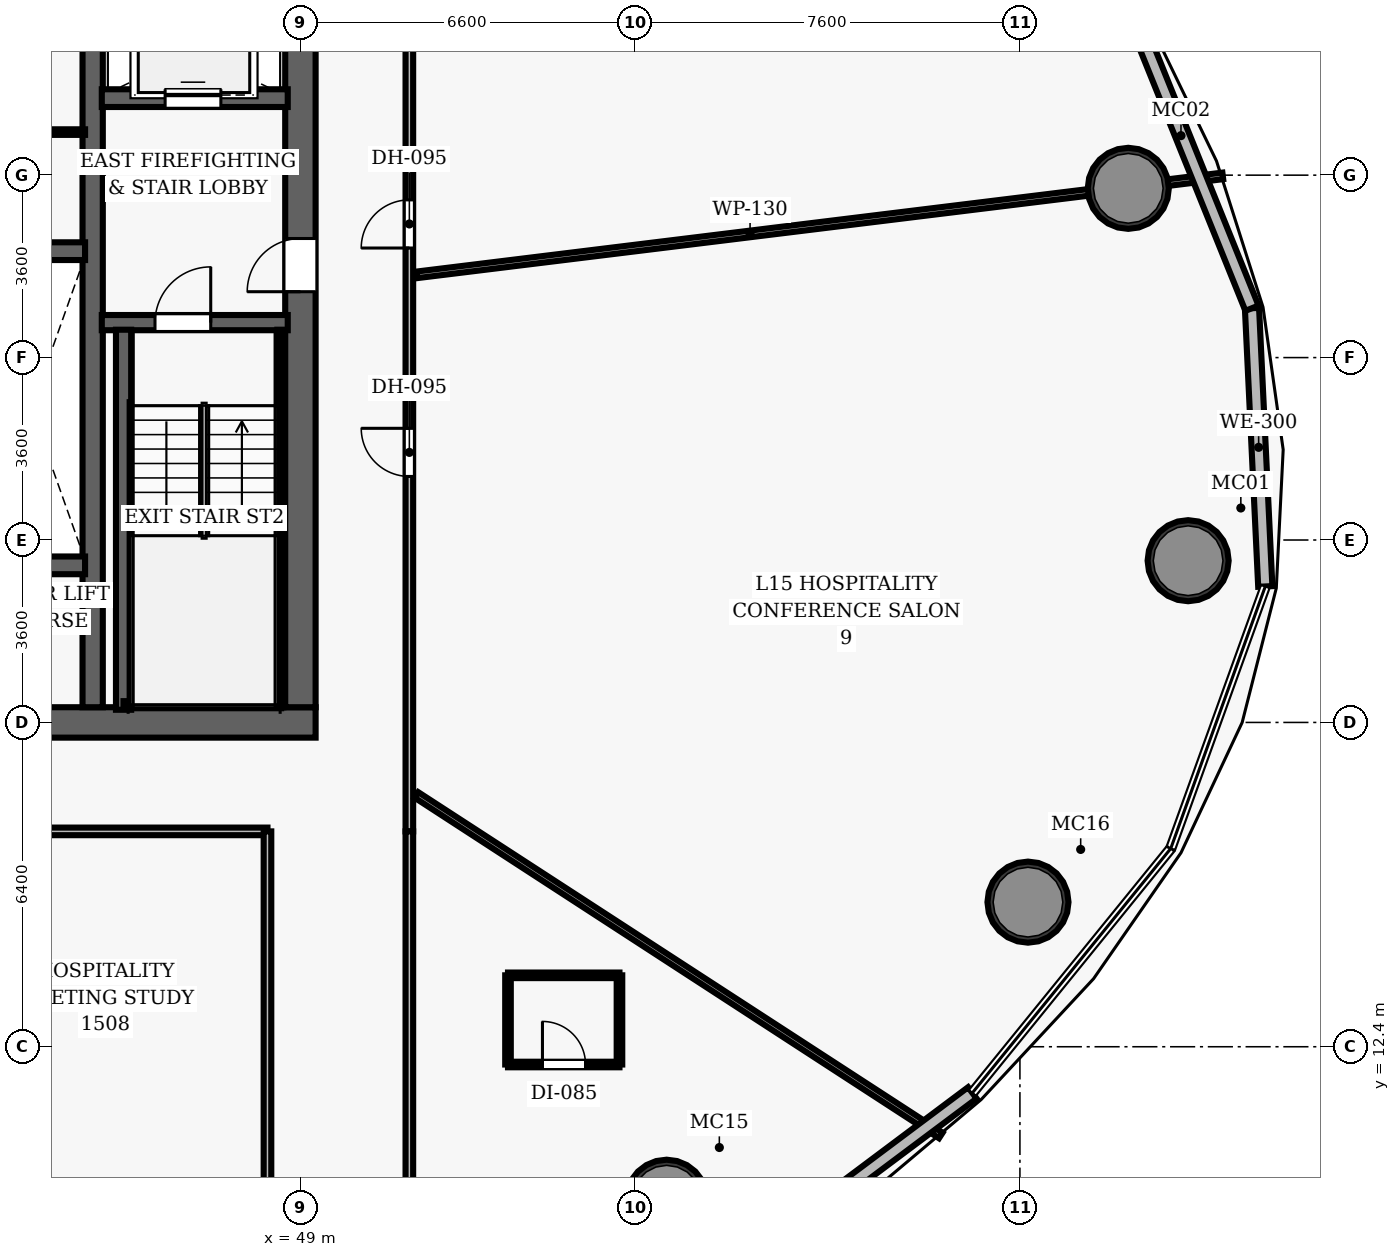
"""IFC4 building model, lengths in metres.
Left out: names, types, materials, properties, quantities, classifications, styles, units other than length and angle.
Written with IfcOpenShell. Run it as: python <this file> out.ifc"""

import sys

from ifc_helpers import new_model, si_unit, direction, frame, frame_2d, origin, origin_2d, place, context, subcontext, project, spatial, rectangle, hollow_circle, extrude, element, fill, save


model = new_model("IFC4")
c1 = context("Model", 3, precision=1e-05, world=origin(), true_north=direction((0.0, 1.0)))
c2 = subcontext(c1, "Body", "Model", "MODEL_VIEW")
j1 = project(units=[si_unit("LENGTHUNIT", "METRE"), si_unit("PLANEANGLEUNIT", "RADIAN")], contexts=[c1])
p1 = place(None, origin())
s1 = spatial("IfcSite", under=j1, at=p1, CompositionType="ELEMENT")
p2 = place(p1, origin())
s2 = spatial("IfcBuilding", under=s1, at=p2, CompositionType="ELEMENT")
p3 = place(p2, frame((0.0, 0.0, 69.4)))
s3 = spatial("IfcBuildingStorey", under=s2, at=p3, CompositionType="ELEMENT", Elevation=69.4)
p4 = place(p3, frame((26.7, 18.8, 0.0), z_axis=(0.0, 0.0, 1.0), x_axis=(1.0, 0.0, 0.0)))
e1 = element("IfcWall", 1, at=p4, inside=s3, PredefinedType="SHEAR", context=c2, shape_type="SweptSolid", body=[
    extrude(rectangle(XDim=22.6, YDim=0.6, at=frame_2d((11.3, 0.0))), origin(), (0.0, 0.0, 1.0), 3.5),
])
p5 = place(p4, frame((14.52, 0.0, 0.0)))
e2 = element("IfcOpeningElement", 2, at=p5, cuts=e1, PredefinedType="OPENING", context=c2, shape_type="SweptSolid", body=[
    extrude(rectangle(XDim=1.05, YDim=2.15, at=frame_2d((0.525, 1.075))), frame((0.0, 0.31, 0.0), z_axis=(0.0, -1.0, 0.0), x_axis=(1.0, 0.0, 0.0)), (0.0, 0.0, 1.0), 0.62),
])
p6 = place(p3, frame((49.0, 19.1, 0.0), z_axis=(0.0, 0.0, 1.0), x_axis=(0.0, 1.0, 0.0)))
e3 = element("IfcWall", 3, at=p6, inside=s3, PredefinedType="SHEAR", context=c2, shape_type="SweptSolid", body=[
    extrude(rectangle(XDim=13.8, YDim=0.6, at=frame_2d((6.9, 0.0))), origin(), (0.0, 0.0, 1.0), 3.5),
])
p7 = place(p6, frame((8.2, 0.0, 0.0)))
e4 = element("IfcOpeningElement", 4, at=p7, cuts=e3, PredefinedType="OPENING", context=c2, shape_type="SweptSolid", body=[
    extrude(rectangle(XDim=1.05, YDim=2.15, at=frame_2d((0.525, 1.075))), frame((0.0, 0.31, 0.0), z_axis=(0.0, -1.0, 0.0), x_axis=(1.0, 0.0, 0.0)), (0.0, 0.0, 1.0), 0.62),
])
p8 = place(p3, frame((44.9, 19.1, 0.0), z_axis=(0.0, 0.0, 1.0), x_axis=(0.0, 1.0, 0.0)))
e5 = element("IfcWall", 5, at=p8, inside=s3, PredefinedType="SHEAR", context=c2, shape_type="SweptSolid", body=[
    extrude(rectangle(XDim=13.8, YDim=0.4, at=frame_2d((6.9, 0.0))), origin(), (0.0, 0.0, 1.0), 3.5),
])
for number, where, z_axis, x_axis in (
    (6, (66.52, 21.992, 0.0), (0.0, 0.0, 1.0), (1.0, 0.0, 0.0)),
    (7, (65.339, 29.34, 0.0), (0.0, 0.0, 1.0), (1.0, 0.0, 0.0)),
    (8, (56.228, 9.371, 0.0), (0.0, 0.0, 1.0), (1.0, 0.0, 0.0)),
    (9, (63.359, 15.254, 0.0), (0.0, 0.0, 1.0), (1.0, 0.0, 0.0)),
):
    element("IfcColumn", number, at=place(p3, frame(where, z_axis=z_axis, x_axis=x_axis)), inside=s3, PredefinedType="COLUMN", context=c2, shape_type="SweptSolid", body=[
        extrude(hollow_circle(Radius=0.8, WallThickness=0.06, at=origin_2d()), origin(), (0.0, 0.0, 1.0), 3.5),
    ])
p9 = place(p3, frame((45.08, 26.69, 0.0), z_axis=(0.0, 0.0, 1.0), x_axis=(1.0, 0.0, 0.0)))
e10 = element("IfcWall", 10, at=p9, inside=s3, PredefinedType="SHEAR", context=c2, shape_type="SweptSolid", body=[
    extrude(rectangle(XDim=3.67, YDim=0.3, at=frame_2d((1.835, 0.0))), origin(), (0.0, 0.0, 1.0), 3.5),
])
p10 = place(p9, frame((1.05, 0.0, 0.0)))
e11 = element("IfcOpeningElement", 11, at=p10, cuts=e10, PredefinedType="OPENING", context=c2, shape_type="SweptSolid", body=[
    extrude(rectangle(XDim=1.1, YDim=2.15, at=frame_2d((0.55, 1.075))), frame((0.0, 0.16, 0.0), z_axis=(0.0, -1.0, 0.0), x_axis=(1.0, 0.0, 0.0)), (0.0, 0.0, 1.0), 0.32),
])
p11 = place(p3, frame((45.51, 19.05, 0.0), z_axis=(0.0, 0.0, 1.0), x_axis=(0.0, 1.0, 0.0)))
e12 = element("IfcWall", 12, at=p11, inside=s3, PredefinedType="SHEAR", context=c2, shape_type="SweptSolid", body=[
    extrude(rectangle(XDim=7.5, YDim=0.3, at=frame_2d((3.75, 0.0))), origin(), (0.0, 0.0, 1.0), 3.5),
])
p12 = place(p3, frame((48.605, 19.1, 0.0), z_axis=(0.0, 0.0, 1.0), x_axis=(0.0, 1.0, 0.0)))
e13 = element("IfcWall", 13, at=p12, inside=s3, PredefinedType="SHEAR", context=c2, shape_type="SweptSolid", body=[
    extrude(rectangle(XDim=7.45, YDim=0.12, at=frame_2d((3.725, 0.0))), origin(), (0.0, 0.0, 1.0), 3.5),
])
p13 = place(p3, frame((45.51, 19.16, 0.0), z_axis=(0.0, 0.0, 1.0), x_axis=(1.0, 0.0, 0.0)))
e14 = element("IfcWall", 14, at=p13, inside=s3, PredefinedType="SHEAR", context=c2, shape_type="SweptSolid", body=[
    extrude(rectangle(XDim=3.095, YDim=0.12, at=frame_2d((1.547, 0.0))), origin(), (0.0, 0.0, 1.0), 3.5),
])
p14 = place(p3, frame((45.08, 31.12, 0.0), z_axis=(0.0, 0.0, 1.0), x_axis=(1.0, 0.0, 0.0)))
e15 = element("IfcWall", 15, at=p14, inside=s3, PredefinedType="SHEAR", context=c2, shape_type="SweptSolid", body=[
    extrude(rectangle(XDim=3.67, YDim=0.35, at=frame_2d((1.835, 0.0))), origin(), (0.0, 0.0, 1.0), 2.6),
])
p15 = place(p14, frame((1.25, 0.0, 0.0)))
e16 = element("IfcOpeningElement", 16, at=p15, cuts=e15, PredefinedType="OPENING", context=c2, shape_type="SweptSolid", body=[
    extrude(rectangle(XDim=1.1, YDim=2.15, at=frame_2d((0.55, 1.075))), frame((0.0, 0.185, 0.0), z_axis=(0.0, -1.0, 0.0), x_axis=(1.0, 0.0, 0.0)), (0.0, 0.0, 1.0), 0.37),
])
for number, where, z_axis, x_axis in (
    (17, (42.72, 21.9, 0.0), (0.0, 0.0, 1.0), (1.0, 0.0, 0.0)),
    (18, (42.72, 28.1, 0.0), (0.0, 0.0, 1.0), (1.0, 0.0, 0.0)),
):
    element("IfcWall", number, at=place(p3, frame(where, z_axis=z_axis, x_axis=x_axis)), inside=s3, PredefinedType="SHEAR", context=c2, shape_type="SweptSolid", body=[
        extrude(rectangle(XDim=2.03, YDim=0.35, at=frame_2d((1.015, 0.0))), origin(), (0.0, 0.0, 1.0), 2.6),
    ])
p16 = place(p3, frame((42.55, 30.45, 0.0), z_axis=(0.0, 0.0, 1.0), x_axis=(1.0, 0.0, 0.0)))
e19 = element("IfcWall", 19, at=p16, inside=s3, PredefinedType="PARTITIONING", context=c2, shape_type="SweptSolid", body=[
    extrude(rectangle(XDim=2.2, YDim=0.11, at=frame_2d((1.1, 0.0))), origin(), (0.0, 0.0, 1.0), 2.6),
])
p17 = place(p3, frame((24.85, 16.65, 0.0), z_axis=(0.0, 0.0, 1.0), x_axis=(1.0, 0.0, 0.0)))
e20 = element("IfcWall", 20, at=p17, inside=s3, PredefinedType="PARTITIONING", context=c2, shape_type="SweptSolid", body=[
    extrude(rectangle(XDim=23.5, YDim=0.15, at=frame_2d((11.75, 0.0))), origin(), (0.0, 0.0, 1.0), 2.6),
])
p18 = place(p17, frame((6.595, 0.0, 0.0)))
e21 = element("IfcOpeningElement", 21, at=p18, cuts=e20, PredefinedType="OPENING", context=c2, shape_type="SweptSolid", body=[
    extrude(rectangle(XDim=0.95, YDim=2.15, at=frame_2d((0.475, 1.075))), frame((0.0, 0.085, 0.0), z_axis=(0.0, -1.0, 0.0), x_axis=(1.0, 0.0, 0.0)), (0.0, 0.0, 1.0), 0.17),
])
p19 = place(p17, frame((13.99, 0.0, 0.0)))
e22 = element("IfcOpeningElement", 22, at=p19, cuts=e20, PredefinedType="OPENING", context=c2, shape_type="SweptSolid", body=[
    extrude(rectangle(XDim=0.95, YDim=2.15, at=frame_2d((0.475, 1.075))), frame((0.0, 0.085, 0.0), z_axis=(0.0, -1.0, 0.0), x_axis=(1.0, 0.0, 0.0)), (0.0, 0.0, 1.0), 0.17),
])
p20 = place(p17, frame((17.211, 0.0, 0.0)))
e23 = element("IfcOpeningElement", 23, at=p20, cuts=e20, PredefinedType="OPENING", context=c2, shape_type="SweptSolid", body=[
    extrude(rectangle(XDim=0.95, YDim=2.15, at=frame_2d((0.475, 1.075))), frame((0.0, 0.085, 0.0), z_axis=(0.0, -1.0, 0.0), x_axis=(1.0, 0.0, 0.0)), (0.0, 0.0, 1.0), 0.17),
])
p21 = place(p3, frame((51.15, 16.65, 0.0), z_axis=(0.0, 0.0, 1.0), x_axis=(0.0, 1.0, 0.0)))
e24 = element("IfcWall", 24, at=p21, inside=s3, PredefinedType="PARTITIONING", context=c2, shape_type="SweptSolid", body=[
    extrude(rectangle(XDim=15.9, YDim=0.15, at=frame_2d((7.95, 0.0))), origin(), (0.0, 0.0, 1.0), 2.6),
])
p22 = place(p21, frame((11.512, 0.0, 0.0)))
e25 = element("IfcOpeningElement", 25, at=p22, cuts=e24, PredefinedType="OPENING", context=c2, shape_type="SweptSolid", body=[
    extrude(rectangle(XDim=0.95, YDim=2.15, at=frame_2d((0.475, 1.075))), frame((0.0, 0.085, 0.0), z_axis=(0.0, -1.0, 0.0), x_axis=(1.0, 0.0, 0.0)), (0.0, 0.0, 1.0), 0.17),
])
p23 = place(p21, frame((7.004, 0.0, 0.0)))
e26 = element("IfcOpeningElement", 26, at=p23, cuts=e24, PredefinedType="OPENING", context=c2, shape_type="SweptSolid", body=[
    extrude(rectangle(XDim=0.95, YDim=2.15, at=frame_2d((0.475, 1.075))), frame((0.0, 0.085, 0.0), z_axis=(0.0, -1.0, 0.0), x_axis=(1.0, 0.0, 0.0)), (0.0, 0.0, 1.0), 0.17),
])
for number, where, z_axis, x_axis in (
    (27, (48.35, 6.5, 0.0), (0.0, 0.0, 1.0), (0.0, 1.0, 0.0)),
    (28, (51.15, 6.5, 0.0), (0.0, 0.0, 1.0), (0.0, 1.0, 0.0)),
):
    element("IfcWall", number, at=place(p3, frame(where, z_axis=z_axis, x_axis=x_axis)), inside=s3, PredefinedType="PARTITIONING", context=c2, shape_type="SweptSolid", body=[
        extrude(rectangle(XDim=10.15, YDim=0.15, at=frame_2d((5.075, 0.0))), origin(), (0.0, 0.0, 1.0), 2.6),
    ])
p24 = place(p3, frame((51.29, 27.632, 0.0), z_axis=(0.0, 0.0, 1.0), x_axis=(0.992547009995, 0.121862352469, 0.0)))
e29 = element("IfcWall", 29, at=p24, inside=s3, PredefinedType="PARTITIONING", context=c2, shape_type="SweptSolid", body=[
    extrude(rectangle(XDim=16.033, YDim=0.13, at=frame_2d((8.017, 0.0))), origin(), (0.0, 0.0, 1.0), 2.6),
])
p25 = place(p3, frame((40.901, 16.51, 0.0), z_axis=(0.0, 0.0, 1.0), x_axis=(0.292374733108, -0.956303830087, 0.0)))
e30 = element("IfcWall", 30, at=p25, inside=s3, PredefinedType="PARTITIONING", context=c2, shape_type="SweptSolid", body=[
    extrude(rectangle(XDim=14.692, YDim=0.13, at=frame_2d((7.346, 0.0))), origin(), (0.0, 0.0, 1.0), 2.6),
])
p26 = place(p3, frame((51.29, 17.369, 0.0), z_axis=(0.0, 0.0, 1.0), x_axis=(0.838662335308, -0.544651711955, 0.0)))
e31 = element("IfcWall", 31, at=p26, inside=s3, PredefinedType="PARTITIONING", context=c2, shape_type="SweptSolid", body=[
    extrude(rectangle(XDim=12.339, YDim=0.13, at=frame_2d((6.17, 0.0))), origin(), (0.0, 0.0, 1.0), 2.6),
])
p27 = place(p3, frame((53.097, 12.049, 0.0), z_axis=(0.0, 0.0, 1.0), x_axis=(1.0, 0.0, 0.0)))
e32 = element("IfcWall", 32, at=p27, inside=s3, PredefinedType="PARTITIONING", context=c2, shape_type="SweptSolid", body=[
    extrude(rectangle(XDim=2.2, YDim=0.11, at=frame_2d((1.1, 0.0))), origin(), (0.0, 0.0, 1.0), 2.6),
])
p28 = place(p27, frame((0.68, 0.0, 0.0)))
e33 = element("IfcOpeningElement", 33, at=p28, cuts=e32, PredefinedType="OPENING", context=c2, shape_type="SweptSolid", body=[
    extrude(rectangle(XDim=0.85, YDim=2.1, at=frame_2d((0.425, 1.05))), frame((0.0, 0.065, 0.0), z_axis=(0.0, -1.0, 0.0), x_axis=(1.0, 0.0, 0.0)), (0.0, 0.0, 1.0), 0.13),
])
p29 = place(p3, frame((53.097, 13.809, 0.0), z_axis=(0.0, 0.0, 1.0), x_axis=(1.0, 0.0, 0.0)))
e34 = element("IfcWall", 34, at=p29, inside=s3, PredefinedType="PARTITIONING", context=c2, shape_type="SweptSolid", body=[
    extrude(rectangle(XDim=2.2, YDim=0.11, at=frame_2d((1.1, 0.0))), origin(), (0.0, 0.0, 1.0), 2.6),
])
for number, where, z_axis, x_axis in (
    (35, (53.097, 12.049, 0.0), (0.0, 0.0, 1.0), (0.0, 1.0, 0.0)),
    (36, (55.297, 12.049, 0.0), (0.0, 0.0, 1.0), (0.0, 1.0, 0.0)),
):
    element("IfcWall", number, at=place(p3, frame(where, z_axis=z_axis, x_axis=x_axis)), inside=s3, PredefinedType="PARTITIONING", context=c2, shape_type="SweptSolid", body=[
        extrude(rectangle(XDim=1.76, YDim=0.11, at=frame_2d((0.88, 0.0))), origin(), (0.0, 0.0, 1.0), 2.6),
    ])
p30 = place(p3, frame((67.78, 26.975, 0.0), z_axis=(0.0, 0.0, 1.0), x_axis=(0.047784583266, -0.998857664336, 0.0)))
e37 = element("IfcWall", 37, at=p30, inside=s3, PredefinedType="SOLIDWALL", context=c2, shape_type="SweptSolid", body=[
    extrude(rectangle(XDim=5.498, YDim=0.28, at=frame_2d((2.749, 0.0))), origin(), (0.0, 0.0, 1.0), 3.25),
])
p31 = place(p3, frame((65.456, 32.735, 0.0), z_axis=(0.0, 0.0, 1.0), x_axis=(0.374153712501, -0.9273667017, 0.0)))
e38 = element("IfcWall", 38, at=p31, inside=s3, PredefinedType="SOLIDWALL", context=c2, shape_type="SweptSolid", body=[
    extrude(rectangle(XDim=6.212, YDim=0.28, at=frame_2d((3.106, 0.0))), origin(), (0.0, 0.0, 1.0), 3.25),
])
p32 = place(p3, frame((62.261, 11.489, 0.0), z_axis=(0.0, 0.0, 1.0), x_axis=(-0.800594336171, -0.599206733015, 0.0)))
e39 = element("IfcWall", 39, at=p32, inside=s3, PredefinedType="SOLIDWALL", context=c2, shape_type="SweptSolid", body=[
    extrude(rectangle(XDim=7.143, YDim=0.28, at=frame_2d((3.571, 0.0))), origin(), (0.0, 0.0, 1.0), 3.25),
])
p33 = place(p10, origin())
e40 = element("IfcDoor", 40, at=p33, inside=s3, OperationType="SINGLE_SWING_RIGHT", PredefinedType="DOOR", context=c2, shape_type="SweptSolid", body=[
    extrude(rectangle(XDim=1.1, YDim=2.15, at=frame_2d((0.55, 1.075))), frame((0.0, 0.025, 0.0), z_axis=(0.0, -1.0, 0.0), x_axis=(1.0, 0.0, 0.0)), (0.0, 0.0, 1.0), 0.05),
])
fill(e11, e40)
p34 = place(p7, origin())
e41 = element("IfcDoor", 41, at=p34, inside=s3, OperationType="SINGLE_SWING_LEFT", PredefinedType="DOOR", context=c2, shape_type="SweptSolid", body=[
    extrude(rectangle(XDim=1.05, YDim=2.15, at=frame_2d((0.525, 1.075))), frame((0.0, 0.025, 0.0), z_axis=(0.0, -1.0, 0.0), x_axis=(1.0, 0.0, 0.0)), (0.0, 0.0, 1.0), 0.05),
])
fill(e4, e41)
p35 = place(p22, origin())
e42 = element("IfcDoor", 42, at=p35, inside=s3, OperationType="SINGLE_SWING_LEFT", PredefinedType="DOOR", context=c2, shape_type="SweptSolid", body=[
    extrude(rectangle(XDim=0.95, YDim=2.15, at=frame_2d((0.475, 1.075))), frame((0.0, 0.025, 0.0), z_axis=(0.0, -1.0, 0.0), x_axis=(1.0, 0.0, 0.0)), (0.0, 0.0, 1.0), 0.05),
])
fill(e25, e42)
p36 = place(p28, origin())
e43 = element("IfcDoor", 43, at=p36, inside=s3, OperationType="SINGLE_SWING_LEFT", PredefinedType="DOOR", context=c2, shape_type="SweptSolid", body=[
    extrude(rectangle(XDim=0.85, YDim=2.1, at=frame_2d((0.425, 1.05))), frame((0.0, 0.025, 0.0), z_axis=(0.0, -1.0, 0.0), x_axis=(1.0, 0.0, 0.0)), (0.0, 0.0, 1.0), 0.05),
])
fill(e33, e43)
p37 = place(p23, origin())
e44 = element("IfcDoor", 44, at=p37, inside=s3, OperationType="SINGLE_SWING_RIGHT", PredefinedType="DOOR", context=c2, shape_type="SweptSolid", body=[
    extrude(rectangle(XDim=0.95, YDim=2.15, at=frame_2d((0.475, 1.075))), frame((0.0, 0.025, 0.0), z_axis=(0.0, -1.0, 0.0), x_axis=(1.0, 0.0, 0.0)), (0.0, 0.0, 1.0), 0.05),
])
fill(e26, e44)
p38 = place(p15, origin())
e45 = element("IfcDoor", 45, at=p38, inside=s3, OperationType="SLIDING_TO_LEFT", PredefinedType="DOOR", context=c2, shape_type="SweptSolid", body=[
    extrude(rectangle(XDim=1.1, YDim=2.15, at=frame_2d((0.55, 1.075))), frame((0.0, 0.025, 0.0), z_axis=(0.0, -1.0, 0.0), x_axis=(1.0, 0.0, 0.0)), (0.0, 0.0, 1.0), 0.05),
])
fill(e16, e45)
save(model, sys.argv[1])
